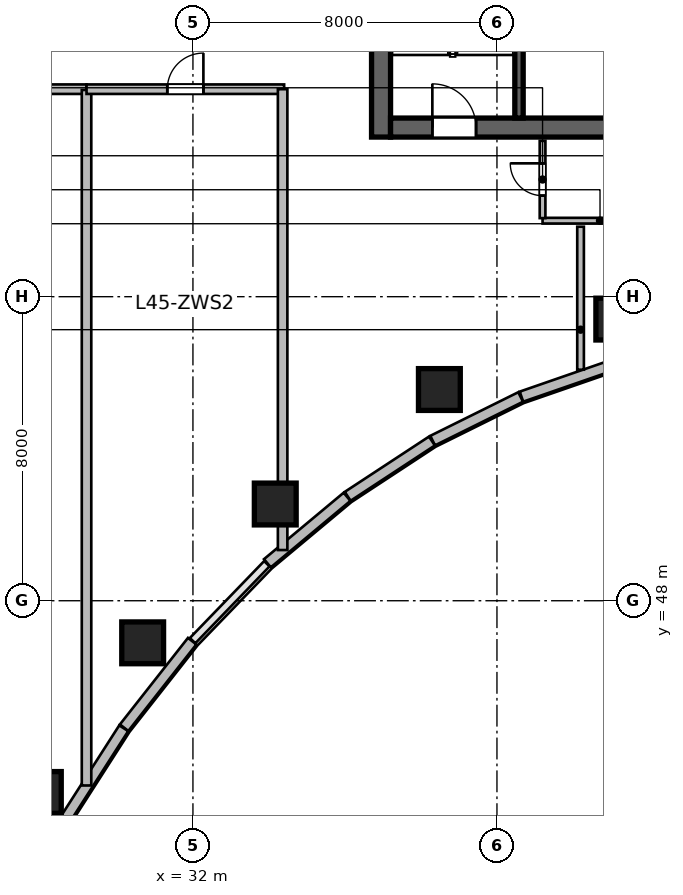
"""IFC4 building model, lengths in metres.
Left out: names, types, materials, properties, quantities, classifications, styles, units other than length and angle.
Written with IfcOpenShell. Run it as: python <this file> out.ifc"""

import sys

from ifc_helpers import new_model, si_unit, direction, frame, frame_2d, origin, origin_2d, place, context, subcontext, project, spatial, rectangle, circle, extrude, source, transform, mapped, element, fill, save


model = new_model("IFC4")
c1 = context("Model", 3, precision=1e-05, world=origin(), true_north=direction((0.0, 1.0)))
c2 = subcontext(c1, "Body", "Model", "MODEL_VIEW")
j1 = project(units=[si_unit("LENGTHUNIT", "METRE"), si_unit("PLANEANGLEUNIT", "RADIAN")], contexts=[c1])
p1 = place(None, origin())
s1 = spatial("IfcSite", under=j1, at=p1, CompositionType="ELEMENT")
p2 = place(p1, origin())
s2 = spatial("IfcBuilding", under=s1, at=p2, CompositionType="ELEMENT")
p3 = place(p2, frame((0.0, 0.0, 185.7)))
s3 = spatial("IfcBuildingStorey", under=s2, at=p3, CompositionType="ELEMENT", Elevation=185.7)
m1 = source(origin(), c2, "Body", "SweptSolid", [
    extrude(rectangle(XDim=12.0, YDim=0.5, at=frame_2d((6.0, 0.0))), origin(), (0.0, 0.0, 1.0), 3.9),
])
p4 = place(p3, frame((36.95, 60.2, 0.0), z_axis=(0.0, 0.0, 1.0), x_axis=(0.0, 1.0, 0.0)))
e1 = element("IfcWall", 1, at=p4, inside=s3, PredefinedType="SHEAR", context=c2, shape_type="MappedRepresentation", body=[
    mapped(m1, transform((0.0, 0.0, 0.0), scale=1.0)),
])
m2 = source(origin(), c2, "Body", "SweptSolid", [
    extrude(rectangle(XDim=21.6, YDim=0.5, at=frame_2d((10.8, 0.0))), origin(), (0.0, 0.0, 1.0), 3.9),
])
p5 = place(p3, frame((37.2, 60.45, 0.0), z_axis=(0.0, 0.0, 1.0), x_axis=(1.0, 0.0, 0.0)))
e2 = element("IfcWall", 2, at=p5, inside=s3, PredefinedType="SHEAR", context=c2, shape_type="MappedRepresentation", body=[
    mapped(m2, transform((0.0, 0.0, 0.0), scale=1.0)),
])
p6 = place(p5, frame((1.1, 0.0, 0.0)))
e3 = element("IfcOpeningElement", 3, at=p6, cuts=e2, PredefinedType="OPENING", context=c2, shape_type="SweptSolid", body=[
    extrude(rectangle(XDim=1.15, YDim=2.15, at=frame_2d((0.575, 1.075))), frame((0.0, 0.26, 0.0), z_axis=(0.0, -1.0, 0.0), x_axis=(1.0, 0.0, 0.0)), (0.0, 0.0, 1.0), 0.52),
])
p7 = place(p5, frame((19.5, 0.0, 0.0)))
e4 = element("IfcOpeningElement", 4, at=p7, cuts=e2, PredefinedType="OPENING", context=c2, shape_type="SweptSolid", body=[
    extrude(rectangle(XDim=0.9, YDim=2.1, at=frame_2d((0.45, 1.05))), frame((0.0, 0.26, 0.0), z_axis=(0.0, -1.0, 0.0), x_axis=(1.0, 0.0, 0.0)), (0.0, 0.0, 1.0), 0.52),
])
p8 = place(p5, frame((12.02, 0.0, 0.0)))
e5 = element("IfcOpeningElement", 5, at=p8, cuts=e2, PredefinedType="OPENING", context=c2, shape_type="SweptSolid", body=[
    extrude(rectangle(XDim=1.6, YDim=2.15, at=frame_2d((0.8, 1.075))), frame((0.0, 0.26, 0.0), z_axis=(0.0, -1.0, 0.0), x_axis=(1.0, 0.0, 0.0)), (0.0, 0.0, 1.0), 0.52),
])
m3 = source(origin(), c2, "Body", "SweptSolid", [
    extrude(rectangle(XDim=11.0, YDim=0.22, at=frame_2d((5.5, 0.0))), origin(), (0.0, 0.0, 1.0), 3.9),
])
p9 = place(p3, frame((40.58, 60.7, 0.0), z_axis=(0.0, 0.0, 1.0), x_axis=(0.0, 1.0, 0.0)))
e6 = element("IfcWall", 6, at=p9, inside=s3, PredefinedType="SHEAR", context=c2, shape_type="MappedRepresentation", body=[
    mapped(m3, transform((0.0, 0.0, 0.0), scale=1.0)),
])
m4 = source(origin(), c2, "Body", "SweptSolid", [
    extrude(circle(Radius=0.55, at=origin_2d()), origin(), (0.0, 0.0, 1.0), 3.9),
])
for number, where, z_axis, x_axis in (
    (7, (27.985, 42.955, 0.0), (0.0, 0.0, 1.0), (-0.691, 0.723, 0.0)),
    (8, (30.677, 46.892, 0.0), (0.0, 0.0, 1.0), (-0.571, 0.821, 0.0)),
    (9, (34.166, 50.545, 0.0), (0.0, 0.0, 1.0), (-0.436, 0.9, 0.0)),
    (10, (38.485, 53.558, 0.0), (0.0, 0.0, 1.0), (-0.289, 0.957, 0.0)),
    (11, (43.154, 55.411, 0.0), (0.0, 0.0, 1.0), (-0.143, 0.99, 0.0)),
):
    element("IfcColumn", number, at=place(p3, frame(where, z_axis=z_axis, x_axis=x_axis)), inside=s3, PredefinedType="COLUMN", context=c2, shape_type="MappedRepresentation", body=[
        mapped(m4, transform((0.0, 0.0, 0.0), scale=1.0)),
    ])
m5 = source(origin(), c2, "Body", "SweptSolid", [
    extrude(rectangle(XDim=2.53, YDim=0.28, at=frame_2d((1.265, 0.0))), origin(), (0.0, 0.0, 1.0), 3.58),
])
p10 = place(p3, frame((43.035, 54.198, 0.0), z_axis=(0.0, 0.0, 1.0), x_axis=(-0.944872429646, -0.327438683872, 0.0)))
e12 = element("IfcWall", 12, at=p10, inside=s3, PredefinedType="SOLIDWALL", context=c2, shape_type="MappedRepresentation", body=[
    mapped(m5, transform((0.0, 0.0, 0.0), scale=1.0)),
])
m6 = source(origin(), c2, "Body", "SweptSolid", [
    extrude(rectangle(XDim=2.584, YDim=0.28, at=frame_2d((1.292, 0.0))), origin(), (0.0, 0.0, 1.0), 3.58),
])
p11 = place(p3, frame((40.624, 53.361, 0.0), z_axis=(0.0, 0.0, 1.0), x_axis=(-0.895989792847, -0.44407464588, 0.0)))
e13 = element("IfcWall", 13, at=p11, inside=s3, PredefinedType="SOLIDWALL", context=c2, shape_type="MappedRepresentation", body=[
    mapped(m6, transform((0.0, 0.0, 0.0), scale=1.0)),
])
m7 = source(origin(), c2, "Body", "SweptSolid", [
    extrude(rectangle(XDim=2.652, YDim=0.28, at=frame_2d((1.326, 0.0))), origin(), (0.0, 0.0, 1.0), 3.58),
])
p12 = place(p3, frame((38.289, 52.202, 0.0), z_axis=(0.0, 0.0, 1.0), x_axis=(-0.836008323535, -0.54871676025, 0.0)))
e14 = element("IfcWall", 14, at=p12, inside=s3, PredefinedType="SOLIDWALL", context=c2, shape_type="MappedRepresentation", body=[
    mapped(m7, transform((0.0, 0.0, 0.0), scale=1.0)),
])
m8 = source(origin(), c2, "Body", "SweptSolid", [
    extrude(rectangle(XDim=2.729, YDim=0.28, at=frame_2d((1.365, 0.0))), origin(), (0.0, 0.0, 1.0), 3.58),
])
p13 = place(p3, frame((36.055, 50.735, 0.0), z_axis=(0.0, 0.0, 1.0), x_axis=(-0.767957284255, -0.640501061326, 0.0)))
e15 = element("IfcWall", 15, at=p13, inside=s3, PredefinedType="SOLIDWALL", context=c2, shape_type="MappedRepresentation", body=[
    mapped(m8, transform((0.0, 0.0, 0.0), scale=1.0)),
])
m9 = source(origin(), c2, "Body", "SweptSolid", [
    extrude(rectangle(XDim=2.897, YDim=0.28, at=frame_2d((1.448, 0.0))), origin(), (0.0, 0.0, 1.0), 3.58),
])
p14 = place(p3, frame((31.979, 46.936, 0.0), z_axis=(0.0, 0.0, 1.0), x_axis=(-0.618167636915, -0.786046291685, 0.0)))
e16 = element("IfcWall", 16, at=p14, inside=s3, PredefinedType="SOLIDWALL", context=c2, shape_type="MappedRepresentation", body=[
    mapped(m9, transform((0.0, 0.0, 0.0), scale=1.0)),
])
m10 = source(origin(), c2, "Body", "SweptSolid", [
    extrude(rectangle(XDim=2.981, YDim=0.28, at=frame_2d((1.49, 0.0))), origin(), (0.0, 0.0, 1.0), 3.58),
])
p15 = place(p3, frame((30.179, 44.645, 0.0), z_axis=(0.0, 0.0, 1.0), x_axis=(-0.540194451908, -0.841540227278, 0.0)))
e17 = element("IfcWall", 17, at=p15, inside=s3, PredefinedType="SOLIDWALL", context=c2, shape_type="MappedRepresentation", body=[
    mapped(m10, transform((0.0, 0.0, 0.0), scale=1.0)),
])
m11 = source(origin(), c2, "Body", "SweptSolid", [
    extrude(rectangle(XDim=5.4, YDim=0.15, at=frame_2d((2.7, 0.0))), origin(), (0.0, 0.0, 1.0), 3.58),
])
p16 = place(p3, frame((41.2, 58.0, 0.0), z_axis=(0.0, 0.0, 1.0), x_axis=(1.0, 0.0, 0.0)))
e18 = element("IfcWall", 18, at=p16, inside=s3, PredefinedType="PARTITIONING", context=c2, shape_type="MappedRepresentation", body=[
    mapped(m11, transform((0.0, 0.0, 0.0), scale=1.0)),
])
p17 = place(p16, frame((2.25, 0.0, 0.0)))
e19 = element("IfcOpeningElement", 19, at=p17, cuts=e18, PredefinedType="OPENING", context=c2, shape_type="SweptSolid", body=[
    extrude(rectangle(XDim=0.9, YDim=2.08, at=frame_2d((0.45, 1.04))), frame((0.0, 0.085, 0.0), z_axis=(0.0, -1.0, 0.0), x_axis=(1.0, 0.0, 0.0)), (0.0, 0.0, 1.0), 0.17),
])
m12 = source(origin(), c2, "Body", "SweptSolid", [
    extrude(rectangle(XDim=2.033, YDim=0.15, at=frame_2d((1.016, 0.0))), origin(), (0.0, 0.0, 1.0), 3.58),
])
p18 = place(p3, frame((41.2, 58.067, 0.0), z_axis=(0.0, 0.0, 1.0), x_axis=(0.0, 1.0, 0.0)))
e20 = element("IfcWall", 20, at=p18, inside=s3, PredefinedType="PARTITIONING", context=c2, shape_type="MappedRepresentation", body=[
    mapped(m12, transform((0.0, 0.0, 0.0), scale=1.0)),
])
p19 = place(p18, frame((0.591, 0.0, 0.0)))
e21 = element("IfcOpeningElement", 21, at=p19, cuts=e20, PredefinedType="OPENING", context=c2, shape_type="SweptSolid", body=[
    extrude(rectangle(XDim=0.85, YDim=2.1, at=frame_2d((0.425, 1.05))), frame((0.0, 0.085, 0.0), z_axis=(0.0, -1.0, 0.0), x_axis=(1.0, 0.0, 0.0)), (0.0, 0.0, 1.0), 0.17),
])
m13 = source(origin(), c2, "Body", "SweptSolid", [
    extrude(rectangle(XDim=3.763, YDim=0.175, at=frame_2d((1.881, 0.0))), origin(), (0.0, 0.0, 1.0), 3.58),
])
p20 = place(p3, frame((42.2, 54.079, 0.0), z_axis=(0.0, 0.0, 1.0), x_axis=(0.0, 1.0, 0.0)))
e22 = element("IfcWall", 22, at=p20, inside=s3, PredefinedType="PARTITIONING", context=c2, shape_type="MappedRepresentation", body=[
    mapped(m13, transform((0.0, 0.0, 0.0), scale=1.0)),
])
m14 = source(origin(), c2, "Body", "SweptSolid", [
    extrude(rectangle(XDim=6.02, YDim=0.25, at=frame_2d((3.01, 0.0))), origin(), (0.0, 0.0, 1.0), 3.58),
])
p21 = place(p3, frame((23.18, 61.46, 0.0), z_axis=(0.0, 0.0, 1.0), x_axis=(1.0, 0.0, 0.0)))
e23 = element("IfcWall", 23, at=p21, inside=s3, PredefinedType="PARTITIONING", context=c2, shape_type="MappedRepresentation", body=[
    mapped(m14, transform((0.0, 0.0, 0.0), scale=1.0)),
])
p22 = place(p21, frame((2.535, 0.0, 0.0)))
e24 = element("IfcOpeningElement", 24, at=p22, cuts=e23, PredefinedType="OPENING", context=c2, shape_type="SweptSolid", body=[
    extrude(rectangle(XDim=0.95, YDim=2.1, at=frame_2d((0.475, 1.05))), frame((0.0, 0.135, 0.0), z_axis=(0.0, -1.0, 0.0), x_axis=(1.0, 0.0, 0.0)), (0.0, 0.0, 1.0), 0.27),
])
m15 = source(origin(), c2, "Body", "SweptSolid", [
    extrude(rectangle(XDim=18.301, YDim=0.25, at=frame_2d((9.15, 0.0))), origin(), (0.0, 0.0, 1.0), 2.872),
])
p23 = place(p3, frame((29.2, 43.139, 0.0), z_axis=(0.0, 0.0, 1.0), x_axis=(0.0, 1.0, 0.0)))
e25 = element("IfcWall", 25, at=p23, inside=s3, PredefinedType="PARTITIONING", context=c2, shape_type="MappedRepresentation", body=[
    mapped(m15, transform((0.0, 0.0, 0.0), scale=1.0)),
])
m16 = source(origin(), c2, "Body", "SweptSolid", [
    extrude(rectangle(XDim=5.2, YDim=0.25, at=frame_2d((2.6, 0.0))), origin(), (0.0, 0.0, 1.0), 3.58),
])
p24 = place(p3, frame((29.2, 61.46, 0.0), z_axis=(0.0, 0.0, 1.0), x_axis=(1.0, 0.0, 0.0)))
e26 = element("IfcWall", 26, at=p24, inside=s3, PredefinedType="PARTITIONING", context=c2, shape_type="MappedRepresentation", body=[
    mapped(m16, transform((0.0, 0.0, 0.0), scale=1.0)),
])
p25 = place(p24, frame((2.125, 0.0, 0.0)))
e27 = element("IfcOpeningElement", 27, at=p25, cuts=e26, PredefinedType="OPENING", context=c2, shape_type="SweptSolid", body=[
    extrude(rectangle(XDim=0.95, YDim=2.1, at=frame_2d((0.475, 1.05))), frame((0.0, 0.135, 0.0), z_axis=(0.0, -1.0, 0.0), x_axis=(1.0, 0.0, 0.0)), (0.0, 0.0, 1.0), 0.27),
])
m17 = source(origin(), c2, "Body", "SweptSolid", [
    extrude(rectangle(XDim=12.126, YDim=0.25, at=frame_2d((6.063, 0.0))), origin(), (0.0, 0.0, 1.0), 3.58),
])
p26 = place(p3, frame((34.36, 49.334, 0.0), z_axis=(0.0, 0.0, 1.0), x_axis=(0.0, 1.0, 0.0)))
e28 = element("IfcWall", 28, at=p26, inside=s3, PredefinedType="PARTITIONING", context=c2, shape_type="MappedRepresentation", body=[
    mapped(m17, transform((0.0, 0.0, 0.0), scale=1.0)),
])
m18 = source(origin(), c2, "Body", "SweptSolid", [
    extrude(rectangle(XDim=1.15, YDim=2.15, at=frame_2d((0.575, 1.075))), frame((0.0, 0.025, 0.0), z_axis=(0.0, -1.0, 0.0), x_axis=(1.0, 0.0, 0.0)), (0.0, 0.0, 1.0), 0.05),
])
p27 = place(p6, origin())
e29 = element("IfcDoor", 29, at=p27, inside=s3, OperationType="SINGLE_SWING_LEFT", PredefinedType="DOOR", context=c2, shape_type="MappedRepresentation", body=[
    mapped(m18, transform((0.0, 0.0, 0.0), scale=1.0)),
])
fill(e3, e29)
m19 = source(origin(), c2, "Body", "SweptSolid", [
    extrude(rectangle(XDim=0.85, YDim=2.1, at=frame_2d((0.425, 1.05))), frame((0.0, 0.025, 0.0), z_axis=(0.0, -1.0, 0.0), x_axis=(1.0, 0.0, 0.0)), (0.0, 0.0, 1.0), 0.05),
])
p28 = place(p19, origin())
e30 = element("IfcDoor", 30, at=p28, inside=s3, OperationType="SINGLE_SWING_RIGHT", PredefinedType="DOOR", context=c2, shape_type="MappedRepresentation", body=[
    mapped(m19, transform((0.0, 0.0, 0.0), scale=1.0)),
])
fill(e21, e30)
m20 = source(origin(), c2, "Body", "SweptSolid", [
    extrude(rectangle(XDim=0.95, YDim=2.1, at=frame_2d((0.475, 1.05))), frame((0.0, 0.025, 0.0), z_axis=(0.0, -1.0, 0.0), x_axis=(1.0, 0.0, 0.0)), (0.0, 0.0, 1.0), 0.05),
])
p29 = place(p25, origin())
e31 = element("IfcDoor", 31, at=p29, inside=s3, OperationType="SINGLE_SWING_RIGHT", PredefinedType="DOOR", context=c2, shape_type="MappedRepresentation", body=[
    mapped(m20, transform((0.0, 0.0, 0.0), scale=1.0)),
])
fill(e27, e31)
save(model, sys.argv[1])
